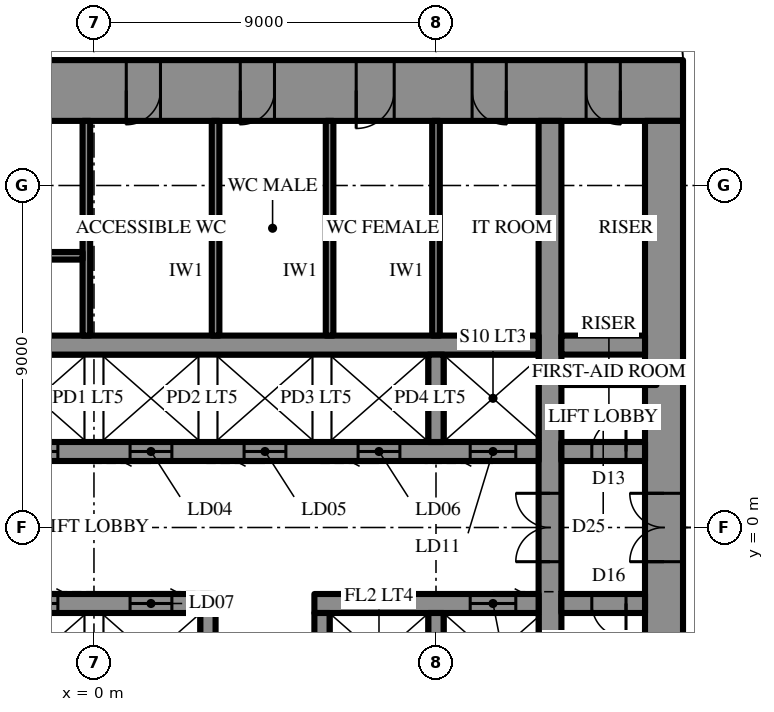
"""IFC4 building model, lengths in metres.
Left out: names, types, materials, properties, quantities, classifications, styles, units other than length and angle.
Written with IfcOpenShell. Run it as: python <this file> out.ifc"""

import sys

from ifc_helpers import new_model, si_unit, direction, frame, frame_2d, origin, place, context, subcontext, project, spatial, rectangle, extrude, element, fill, save


model = new_model("IFC4")
c1 = context("Model", 3, precision=1e-05, world=origin(), true_north=direction((0.0, 1.0)))
c2 = subcontext(c1, "Body", "Model", "MODEL_VIEW")
j1 = project(units=[si_unit("LENGTHUNIT", "METRE"), si_unit("PLANEANGLEUNIT", "RADIAN")], contexts=[c1])
p1 = place(None, origin())
s1 = spatial("IfcSite", under=j1, at=p1, CompositionType="ELEMENT")
p2 = place(p1, origin())
s2 = spatial("IfcBuilding", under=s1, at=p2, CompositionType="ELEMENT")
p3 = place(p2, frame((0.0, 0.0, 306.5)))
s3 = spatial("IfcBuildingStorey", under=s2, at=p3, CompositionType="ELEMENT", Elevation=306.5)
p4 = place(p3, frame((-15.5, 11.5, 0.0), z_axis=(0.0, 0.0, 1.0), x_axis=(1.0, 0.0, 0.0)))
e1 = element("IfcWall", 1, at=p4, inside=s3, PredefinedType="SHEAR", context=c2, shape_type="SweptSolid", body=[
    extrude(rectangle(XDim=31.0, YDim=1.6, at=frame_2d((15.5, 0.0))), origin(), (0.0, 0.0, 1.0), 5.0),
])
p5 = place(p4, frame((16.35, 0.0, 0.0)))
e2 = element("IfcOpeningElement", 2, at=p5, cuts=e1, PredefinedType="OPENING", context=c2, shape_type="SweptSolid", body=[
    extrude(rectangle(XDim=0.9, YDim=2.2, at=frame_2d((0.45, 1.1))), frame((0.0, 0.81, 0.0), z_axis=(0.0, -1.0, 0.0), x_axis=(1.0, 0.0, 0.0)), (0.0, 0.0, 1.0), 1.62),
])
p6 = place(p4, frame((19.35, 0.0, 0.0)))
e3 = element("IfcOpeningElement", 3, at=p6, cuts=e1, PredefinedType="OPENING", context=c2, shape_type="SweptSolid", body=[
    extrude(rectangle(XDim=0.9, YDim=2.2, at=frame_2d((0.45, 1.1))), frame((0.0, 0.81, 0.0), z_axis=(0.0, -1.0, 0.0), x_axis=(1.0, 0.0, 0.0)), (0.0, 0.0, 1.0), 1.62),
])
p7 = place(p4, frame((22.4, 0.0, 0.0)))
e4 = element("IfcOpeningElement", 4, at=p7, cuts=e1, PredefinedType="OPENING", context=c2, shape_type="SweptSolid", body=[
    extrude(rectangle(XDim=1.0, YDim=2.2, at=frame_2d((0.5, 1.1))), frame((0.0, 0.81, 0.0), z_axis=(0.0, -1.0, 0.0), x_axis=(1.0, 0.0, 0.0)), (0.0, 0.0, 1.0), 1.62),
])
p8 = place(p4, frame((1.65, 0.0, 0.0)))
e5 = element("IfcOpeningElement", 5, at=p8, cuts=e1, PredefinedType="OPENING", context=c2, shape_type="SweptSolid", body=[
    extrude(rectangle(XDim=0.9, YDim=2.2, at=frame_2d((0.45, 1.1))), frame((0.0, 0.81, 0.0), z_axis=(0.0, -1.0, 0.0), x_axis=(1.0, 0.0, 0.0)), (0.0, 0.0, 1.0), 1.62),
])
p9 = place(p4, frame((4.65, 0.0, 0.0)))
e6 = element("IfcOpeningElement", 6, at=p9, cuts=e1, PredefinedType="OPENING", context=c2, shape_type="SweptSolid", body=[
    extrude(rectangle(XDim=0.9, YDim=2.2, at=frame_2d((0.45, 1.1))), frame((0.0, 0.81, 0.0), z_axis=(0.0, -1.0, 0.0), x_axis=(1.0, 0.0, 0.0)), (0.0, 0.0, 1.0), 1.62),
])
p10 = place(p4, frame((25.45, 0.0, 0.0)))
e7 = element("IfcOpeningElement", 7, at=p10, cuts=e1, PredefinedType="OPENING", context=c2, shape_type="SweptSolid", body=[
    extrude(rectangle(XDim=0.9, YDim=2.2, at=frame_2d((0.45, 1.1))), frame((0.0, 0.81, 0.0), z_axis=(0.0, -1.0, 0.0), x_axis=(1.0, 0.0, 0.0)), (0.0, 0.0, 1.0), 1.62),
])
p11 = place(p4, frame((28.45, 0.0, 0.0)))
e8 = element("IfcOpeningElement", 8, at=p11, cuts=e1, PredefinedType="OPENING", context=c2, shape_type="SweptSolid", body=[
    extrude(rectangle(XDim=0.9, YDim=2.2, at=frame_2d((0.45, 1.1))), frame((0.0, 0.81, 0.0), z_axis=(0.0, -1.0, 0.0), x_axis=(1.0, 0.0, 0.0)), (0.0, 0.0, 1.0), 1.62),
])
p12 = place(p3, frame((15.0, -10.7, 0.0), z_axis=(0.0, 0.0, 1.0), x_axis=(0.0, 1.0, 0.0)))
e9 = element("IfcWall", 9, at=p12, inside=s3, PredefinedType="SHEAR", context=c2, shape_type="SweptSolid", body=[
    extrude(rectangle(XDim=21.4, YDim=1.0, at=frame_2d((10.7, 0.0))), origin(), (0.0, 0.0, 1.0), 5.0),
])
p13 = place(p12, frame((9.8, 0.0, 0.0)))
e10 = element("IfcOpeningElement", 10, at=p13, cuts=e9, PredefinedType="OPENING", context=c2, shape_type="SweptSolid", body=[
    extrude(rectangle(XDim=1.8, YDim=2.4, at=frame_2d((0.9, 1.2))), frame((0.0, 0.51, 0.0), z_axis=(0.0, -1.0, 0.0), x_axis=(1.0, 0.0, 0.0)), (0.0, 0.0, 1.0), 1.02),
])
p14 = place(p3, frame((12.0, -10.7, 0.0), z_axis=(0.0, 0.0, 1.0), x_axis=(0.0, 1.0, 0.0)))
e11 = element("IfcWall", 11, at=p14, inside=s3, PredefinedType="SHEAR", context=c2, shape_type="SweptSolid", body=[
    extrude(rectangle(XDim=21.4, YDim=0.6, at=frame_2d((10.7, 0.0))), origin(), (0.0, 0.0, 1.0), 5.0),
])
p15 = place(p14, frame((9.8, 0.0, 0.0)))
e12 = element("IfcOpeningElement", 12, at=p15, cuts=e11, PredefinedType="OPENING", context=c2, shape_type="SweptSolid", body=[
    extrude(rectangle(XDim=1.8, YDim=2.4, at=frame_2d((0.9, 1.2))), frame((0.0, 0.31, 0.0), z_axis=(0.0, -1.0, 0.0), x_axis=(1.0, 0.0, 0.0)), (0.0, 0.0, 1.0), 0.62),
])
p16 = place(p3, frame((-3.2, 2.0, 0.0), z_axis=(0.0, 0.0, 1.0), x_axis=(1.0, 0.0, 0.0)))
e13 = element("IfcWall", 13, at=p16, inside=s3, PredefinedType="SHEAR", context=c2, shape_type="SweptSolid", body=[
    extrude(rectangle(XDim=14.9, YDim=0.5, at=frame_2d((7.45, 0.0))), origin(), (0.0, 0.0, 1.0), 5.0),
])
p17 = place(p16, frame((1.15, 0.0, 0.0)))
e14 = element("IfcOpeningElement", 14, at=p17, cuts=e13, PredefinedType="OPENING", context=c2, shape_type="SweptSolid", body=[
    extrude(rectangle(XDim=1.1, YDim=2.2, at=frame_2d((0.55, 1.1))), frame((0.0, 0.26, 0.0), z_axis=(0.0, -1.0, 0.0), x_axis=(1.0, 0.0, 0.0)), (0.0, 0.0, 1.0), 0.52),
])
p18 = place(p16, frame((4.15, 0.0, 0.0)))
e15 = element("IfcOpeningElement", 15, at=p18, cuts=e13, PredefinedType="OPENING", context=c2, shape_type="SweptSolid", body=[
    extrude(rectangle(XDim=1.1, YDim=2.2, at=frame_2d((0.55, 1.1))), frame((0.0, 0.26, 0.0), z_axis=(0.0, -1.0, 0.0), x_axis=(1.0, 0.0, 0.0)), (0.0, 0.0, 1.0), 0.52),
])
p19 = place(p16, frame((7.15, 0.0, 0.0)))
e16 = element("IfcOpeningElement", 16, at=p19, cuts=e13, PredefinedType="OPENING", context=c2, shape_type="SweptSolid", body=[
    extrude(rectangle(XDim=1.1, YDim=2.2, at=frame_2d((0.55, 1.1))), frame((0.0, 0.26, 0.0), z_axis=(0.0, -1.0, 0.0), x_axis=(1.0, 0.0, 0.0)), (0.0, 0.0, 1.0), 0.52),
])
p20 = place(p16, frame((10.15, 0.0, 0.0)))
e17 = element("IfcOpeningElement", 17, at=p20, cuts=e13, PredefinedType="OPENING", context=c2, shape_type="SweptSolid", body=[
    extrude(rectangle(XDim=1.1, YDim=2.2, at=frame_2d((0.55, 1.1))), frame((0.0, 0.26, 0.0), z_axis=(0.0, -1.0, 0.0), x_axis=(1.0, 0.0, 0.0)), (0.0, 0.0, 1.0), 0.52),
])
p21 = place(p16, frame((13.1, 0.0, 0.0)))
e18 = element("IfcOpeningElement", 18, at=p21, cuts=e13, PredefinedType="OPENING", context=c2, shape_type="SweptSolid", body=[
    extrude(rectangle(XDim=1.2, YDim=2.2, at=frame_2d((0.6, 1.1))), frame((0.0, 0.26, 0.0), z_axis=(0.0, -1.0, 0.0), x_axis=(1.0, 0.0, 0.0)), (0.0, 0.0, 1.0), 0.52),
])
p22 = place(p3, frame((12.3, 2.0, 0.0), z_axis=(0.0, 0.0, 1.0), x_axis=(1.0, 0.0, 0.0)))
e19 = element("IfcWall", 19, at=p22, inside=s3, PredefinedType="SHEAR", context=c2, shape_type="SweptSolid", body=[
    extrude(rectangle(XDim=2.2, YDim=0.5, at=frame_2d((1.1, 0.0))), origin(), (0.0, 0.0, 1.0), 5.0),
])
p23 = place(p22, frame((0.8, 0.0, 0.0)))
e20 = element("IfcOpeningElement", 20, at=p23, cuts=e19, PredefinedType="OPENING", context=c2, shape_type="SweptSolid", body=[
    extrude(rectangle(XDim=0.9, YDim=2.2, at=frame_2d((0.45, 1.1))), frame((0.0, 0.26, 0.0), z_axis=(0.0, -1.0, 0.0), x_axis=(1.0, 0.0, 0.0)), (0.0, 0.0, 1.0), 0.52),
])
p24 = place(p3, frame((-11.7, 4.8, 0.0), z_axis=(0.0, 0.0, 1.0), x_axis=(1.0, 0.0, 0.0)))
e21 = element("IfcWall", 21, at=p24, inside=s3, PredefinedType="SHEAR", context=c2, shape_type="SweptSolid", body=[
    extrude(rectangle(XDim=23.4, YDim=0.5, at=frame_2d((11.7, 0.0))), origin(), (0.0, 0.0, 1.0), 5.0),
])
p25 = place(p24, frame((6.6, 0.0, 0.0)))
e22 = element("IfcOpeningElement", 22, at=p25, cuts=e21, PredefinedType="OPENING", context=c2, shape_type="SweptSolid", body=[
    extrude(rectangle(XDim=1.2, YDim=2.2, at=frame_2d((0.6, 1.1))), frame((0.0, 0.26, 0.0), z_axis=(0.0, -1.0, 0.0), x_axis=(1.0, 0.0, 0.0)), (0.0, 0.0, 1.0), 0.52),
])
p26 = place(p24, frame((3.6, 0.0, 0.0)))
e23 = element("IfcOpeningElement", 23, at=p26, cuts=e21, PredefinedType="OPENING", context=c2, shape_type="SweptSolid", body=[
    extrude(rectangle(XDim=1.2, YDim=2.2, at=frame_2d((0.6, 1.1))), frame((0.0, 0.26, 0.0), z_axis=(0.0, -1.0, 0.0), x_axis=(1.0, 0.0, 0.0)), (0.0, 0.0, 1.0), 0.52),
])
p27 = place(p3, frame((12.3, 4.8, 0.0), z_axis=(0.0, 0.0, 1.0), x_axis=(1.0, 0.0, 0.0)))
e24 = element("IfcWall", 24, at=p27, inside=s3, PredefinedType="SHEAR", context=c2, shape_type="SweptSolid", body=[
    extrude(rectangle(XDim=2.2, YDim=0.5, at=frame_2d((1.1, 0.0))), origin(), (0.0, 0.0, 1.0), 5.0),
])
p28 = place(p3, frame((9.0, 2.25, 0.0), z_axis=(0.0, 0.0, 1.0), x_axis=(0.0, 1.0, 0.0)))
e25 = element("IfcWall", 25, at=p28, inside=s3, PredefinedType="SHEAR", context=c2, shape_type="SweptSolid", body=[
    extrude(rectangle(XDim=2.3, YDim=0.4, at=frame_2d((1.15, 0.0))), origin(), (0.0, 0.0, 1.0), 5.0),
])
p29 = place(p3, frame((-0.2, 5.05, 0.0), z_axis=(0.0, 0.0, 1.0), x_axis=(0.0, 1.0, 0.0)))
e26 = element("IfcWall", 26, at=p29, inside=s3, PredefinedType="SHEAR", context=c2, shape_type="SweptSolid", body=[
    extrude(rectangle(XDim=5.65, YDim=0.2, at=frame_2d((2.825, 0.0))), origin(), (0.0, 0.0, 1.0), 5.0),
])
p30 = place(p3, frame((-8.9, 7.15, 0.0), z_axis=(0.0, 0.0, 1.0), x_axis=(1.0, 0.0, 0.0)))
e27 = element("IfcWall", 27, at=p30, inside=s3, PredefinedType="SHEAR", context=c2, shape_type="SweptSolid", body=[
    extrude(rectangle(XDim=8.6, YDim=0.2, at=frame_2d((4.3, 0.0))), origin(), (0.0, 0.0, 1.0), 5.0),
])
p31 = place(p30, frame((0.3, 0.0, 0.0)))
e28 = element("IfcOpeningElement", 28, at=p31, cuts=e27, PredefinedType="OPENING", context=c2, shape_type="SweptSolid", body=[
    extrude(rectangle(XDim=1.0, YDim=2.2, at=frame_2d((0.5, 1.1))), frame((0.0, 0.11, 0.0), z_axis=(0.0, -1.0, 0.0), x_axis=(1.0, 0.0, 0.0)), (0.0, 0.0, 1.0), 0.22),
])
p32 = place(p3, frame((14.5, -2.0, 0.0), z_axis=(0.0, 0.0, 1.0), x_axis=(-1.0, 0.0, 0.0)))
e29 = element("IfcWall", 29, at=p32, inside=s3, PredefinedType="SHEAR", context=c2, shape_type="SweptSolid", body=[
    extrude(rectangle(XDim=2.2, YDim=0.5, at=frame_2d((1.1, 0.0))), origin(), (0.0, 0.0, 1.0), 5.0),
])
p33 = place(p32, frame((0.5, 0.0, 0.0)))
e30 = element("IfcOpeningElement", 30, at=p33, cuts=e29, PredefinedType="OPENING", context=c2, shape_type="SweptSolid", body=[
    extrude(rectangle(XDim=0.9, YDim=2.2, at=frame_2d((0.45, 1.1))), frame((0.0, 0.26, 0.0), z_axis=(0.0, -1.0, 0.0), x_axis=(1.0, 0.0, 0.0)), (0.0, 0.0, 1.0), 0.52),
])
p34 = place(p3, frame((11.7, -2.0, 0.0), z_axis=(0.0, 0.0, 1.0), x_axis=(-1.0, 0.0, 0.0)))
e31 = element("IfcWall", 31, at=p34, inside=s3, PredefinedType="SHEAR", context=c2, shape_type="SweptSolid", body=[
    extrude(rectangle(XDim=5.9, YDim=0.5, at=frame_2d((2.95, 0.0))), origin(), (0.0, 0.0, 1.0), 5.0),
])
p35 = place(p34, frame((0.6, 0.0, 0.0)))
e32 = element("IfcOpeningElement", 32, at=p35, cuts=e31, PredefinedType="OPENING", context=c2, shape_type="SweptSolid", body=[
    extrude(rectangle(XDim=1.2, YDim=2.2, at=frame_2d((0.6, 1.1))), frame((0.0, 0.26, 0.0), z_axis=(0.0, -1.0, 0.0), x_axis=(1.0, 0.0, 0.0)), (0.0, 0.0, 1.0), 0.52),
])
p36 = place(p3, frame((3.2, -2.0, 0.0), z_axis=(0.0, 0.0, 1.0), x_axis=(-1.0, 0.0, 0.0)))
e33 = element("IfcWall", 33, at=p36, inside=s3, PredefinedType="SHEAR", context=c2, shape_type="SweptSolid", body=[
    extrude(rectangle(XDim=14.9, YDim=0.5, at=frame_2d((7.45, 0.0))), origin(), (0.0, 0.0, 1.0), 5.0),
])
p37 = place(p36, frame((1.15, 0.0, 0.0)))
e34 = element("IfcOpeningElement", 34, at=p37, cuts=e33, PredefinedType="OPENING", context=c2, shape_type="SweptSolid", body=[
    extrude(rectangle(XDim=1.1, YDim=2.2, at=frame_2d((0.55, 1.1))), frame((0.0, 0.26, 0.0), z_axis=(0.0, -1.0, 0.0), x_axis=(1.0, 0.0, 0.0)), (0.0, 0.0, 1.0), 0.52),
])
p38 = place(p36, frame((4.15, 0.0, 0.0)))
e35 = element("IfcOpeningElement", 35, at=p38, cuts=e33, PredefinedType="OPENING", context=c2, shape_type="SweptSolid", body=[
    extrude(rectangle(XDim=1.1, YDim=2.2, at=frame_2d((0.55, 1.1))), frame((0.0, 0.26, 0.0), z_axis=(0.0, -1.0, 0.0), x_axis=(1.0, 0.0, 0.0)), (0.0, 0.0, 1.0), 0.52),
])
p39 = place(p36, frame((7.15, 0.0, 0.0)))
e36 = element("IfcOpeningElement", 36, at=p39, cuts=e33, PredefinedType="OPENING", context=c2, shape_type="SweptSolid", body=[
    extrude(rectangle(XDim=1.1, YDim=2.2, at=frame_2d((0.55, 1.1))), frame((0.0, 0.26, 0.0), z_axis=(0.0, -1.0, 0.0), x_axis=(1.0, 0.0, 0.0)), (0.0, 0.0, 1.0), 0.52),
])
p40 = place(p36, frame((10.15, 0.0, 0.0)))
e37 = element("IfcOpeningElement", 37, at=p40, cuts=e33, PredefinedType="OPENING", context=c2, shape_type="SweptSolid", body=[
    extrude(rectangle(XDim=1.1, YDim=2.2, at=frame_2d((0.55, 1.1))), frame((0.0, 0.26, 0.0), z_axis=(0.0, -1.0, 0.0), x_axis=(1.0, 0.0, 0.0)), (0.0, 0.0, 1.0), 0.52),
])
p41 = place(p36, frame((13.1, 0.0, 0.0)))
e38 = element("IfcOpeningElement", 38, at=p41, cuts=e33, PredefinedType="OPENING", context=c2, shape_type="SweptSolid", body=[
    extrude(rectangle(XDim=1.2, YDim=2.2, at=frame_2d((0.6, 1.1))), frame((0.0, 0.26, 0.0), z_axis=(0.0, -1.0, 0.0), x_axis=(1.0, 0.0, 0.0)), (0.0, 0.0, 1.0), 0.52),
])
for number, where, z_axis, x_axis in (
    (39, (9.0, -2.25, 0.0), (0.0, 0.0, 1.0), (0.0, -1.0, 0.0)),
    (40, (6.0, -2.25, 0.0), (0.0, 0.0, 1.0), (0.0, -1.0, 0.0)),
    (41, (3.0, -2.25, 0.0), (0.0, 0.0, 1.0), (0.0, -1.0, 0.0)),
):
    element("IfcWall", number, at=place(p3, frame(where, z_axis=z_axis, x_axis=x_axis)), inside=s3, PredefinedType="SHEAR", context=c2, shape_type="SweptSolid", body=[
        extrude(rectangle(XDim=2.3, YDim=0.4, at=frame_2d((1.15, 0.0))), origin(), (0.0, 0.0, 1.0), 5.0),
    ])
for number, where, z_axis, x_axis in (
    (42, (9.0, 5.05, 0.0), (0.0, 0.0, 1.0), (0.0, 1.0, 0.0)),
    (43, (3.2, 5.05, 0.0), (0.0, 0.0, 1.0), (0.0, 1.0, 0.0)),
    (44, (6.2, 5.05, 0.0), (0.0, 0.0, 1.0), (0.0, 1.0, 0.0)),
):
    element("IfcWall", number, at=place(p3, frame(where, z_axis=z_axis, x_axis=x_axis)), inside=s3, PredefinedType="PARTITIONING", context=c2, shape_type="SweptSolid", body=[
        extrude(rectangle(XDim=5.65, YDim=0.2, at=frame_2d((2.825, 0.0))), origin(), (0.0, 0.0, 1.0), 4.8),
    ])
p42 = place(p3, frame((12.3, 3.85, 0.0), z_axis=(0.0, 0.0, 1.0), x_axis=(1.0, 0.0, 0.0)))
e45 = element("IfcWall", 45, at=p42, inside=s3, PredefinedType="PARTITIONING", context=c2, shape_type="SweptSolid", body=[
    extrude(rectangle(XDim=2.5, YDim=0.2, at=frame_2d((1.25, 0.0))), origin(), (0.0, 0.0, 1.0), 4.8),
])
p43 = place(p13, origin())
e46 = element("IfcDoor", 46, at=p43, inside=s3, OperationType="DOUBLE_DOOR_SINGLE_SWING", PredefinedType="DOOR", context=c2, shape_type="SweptSolid", body=[
    extrude(rectangle(XDim=1.8, YDim=2.4, at=frame_2d((0.9, 1.2))), frame((0.0, 0.025, 0.0), z_axis=(0.0, -1.0, 0.0), x_axis=(1.0, 0.0, 0.0)), (0.0, 0.0, 1.0), 0.05),
])
fill(e10, e46)
p44 = place(p5, frame((0.9, 0.0, 0.0), z_axis=(0.0, 0.0, 1.0), x_axis=(-1.0, 0.0, 0.0)))
e47 = element("IfcDoor", 47, at=p44, inside=s3, OperationType="SINGLE_SWING_LEFT", PredefinedType="DOOR", context=c2, shape_type="SweptSolid", body=[
    extrude(rectangle(XDim=0.9, YDim=2.2, at=frame_2d((0.45, 1.1))), frame((0.0, 0.025, 0.0), z_axis=(0.0, -1.0, 0.0), x_axis=(1.0, 0.0, 0.0)), (0.0, 0.0, 1.0), 0.05),
])
fill(e2, e47)
p45 = place(p6, frame((0.9, 0.0, 0.0), z_axis=(0.0, 0.0, 1.0), x_axis=(-1.0, 0.0, 0.0)))
e48 = element("IfcDoor", 48, at=p45, inside=s3, OperationType="SINGLE_SWING_LEFT", PredefinedType="DOOR", context=c2, shape_type="SweptSolid", body=[
    extrude(rectangle(XDim=0.9, YDim=2.2, at=frame_2d((0.45, 1.1))), frame((0.0, 0.025, 0.0), z_axis=(0.0, -1.0, 0.0), x_axis=(1.0, 0.0, 0.0)), (0.0, 0.0, 1.0), 0.05),
])
fill(e3, e48)
p46 = place(p7, frame((1.0, 0.0, 0.0), z_axis=(0.0, 0.0, 1.0), x_axis=(-1.0, 0.0, 0.0)))
e49 = element("IfcDoor", 49, at=p46, inside=s3, OperationType="SINGLE_SWING_LEFT", PredefinedType="DOOR", context=c2, shape_type="SweptSolid", body=[
    extrude(rectangle(XDim=1.0, YDim=2.2, at=frame_2d((0.5, 1.1))), frame((0.0, 0.025, 0.0), z_axis=(0.0, -1.0, 0.0), x_axis=(1.0, 0.0, 0.0)), (0.0, 0.0, 1.0), 0.05),
])
fill(e4, e49)
p47 = place(p10, frame((0.9, 0.0, 0.0), z_axis=(0.0, 0.0, 1.0), x_axis=(-1.0, 0.0, 0.0)))
e50 = element("IfcDoor", 50, at=p47, inside=s3, OperationType="SINGLE_SWING_RIGHT", PredefinedType="DOOR", context=c2, shape_type="SweptSolid", body=[
    extrude(rectangle(XDim=0.9, YDim=2.2, at=frame_2d((0.45, 1.1))), frame((0.0, 0.025, 0.0), z_axis=(0.0, -1.0, 0.0), x_axis=(1.0, 0.0, 0.0)), (0.0, 0.0, 1.0), 0.05),
])
fill(e7, e50)
p48 = place(p11, frame((0.9, 0.0, 0.0), z_axis=(0.0, 0.0, 1.0), x_axis=(-1.0, 0.0, 0.0)))
e51 = element("IfcDoor", 51, at=p48, inside=s3, OperationType="SINGLE_SWING_RIGHT", PredefinedType="DOOR", context=c2, shape_type="SweptSolid", body=[
    extrude(rectangle(XDim=0.9, YDim=2.2, at=frame_2d((0.45, 1.1))), frame((0.0, 0.025, 0.0), z_axis=(0.0, -1.0, 0.0), x_axis=(1.0, 0.0, 0.0)), (0.0, 0.0, 1.0), 0.05),
])
fill(e8, e51)
p49 = place(p23, origin())
e52 = element("IfcDoor", 52, at=p49, inside=s3, OperationType="SINGLE_SWING_LEFT", PredefinedType="DOOR", context=c2, shape_type="SweptSolid", body=[
    extrude(rectangle(XDim=0.9, YDim=2.2, at=frame_2d((0.45, 1.1))), frame((0.0, 0.025, 0.0), z_axis=(0.0, -1.0, 0.0), x_axis=(1.0, 0.0, 0.0)), (0.0, 0.0, 1.0), 0.05),
])
fill(e20, e52)
p50 = place(p33, origin())
e53 = element("IfcDoor", 53, at=p50, inside=s3, OperationType="SINGLE_SWING_RIGHT", PredefinedType="DOOR", context=c2, shape_type="SweptSolid", body=[
    extrude(rectangle(XDim=0.9, YDim=2.2, at=frame_2d((0.45, 1.1))), frame((0.0, 0.025, 0.0), z_axis=(0.0, -1.0, 0.0), x_axis=(1.0, 0.0, 0.0)), (0.0, 0.0, 1.0), 0.05),
])
fill(e30, e53)
p51 = place(p15, origin())
e54 = element("IfcDoor", 54, at=p51, inside=s3, OperationType="DOUBLE_DOOR_SINGLE_SWING", PredefinedType="DOOR", context=c2, shape_type="SweptSolid", body=[
    extrude(rectangle(XDim=1.8, YDim=2.4, at=frame_2d((0.9, 1.2))), frame((0.0, 0.025, 0.0), z_axis=(0.0, -1.0, 0.0), x_axis=(1.0, 0.0, 0.0)), (0.0, 0.0, 1.0), 0.05),
])
fill(e12, e54)
p52 = place(p17, frame((1.1, 0.0, 0.0), z_axis=(0.0, 0.0, 1.0), x_axis=(-1.0, 0.0, 0.0)))
e55 = element("IfcDoor", 55, at=p52, inside=s3, OperationType="SLIDING_TO_LEFT", PredefinedType="DOOR", context=c2, shape_type="SweptSolid", body=[
    extrude(rectangle(XDim=1.1, YDim=2.2, at=frame_2d((0.55, 1.1))), frame((0.0, 0.025, 0.0), z_axis=(0.0, -1.0, 0.0), x_axis=(1.0, 0.0, 0.0)), (0.0, 0.0, 1.0), 0.05),
])
fill(e14, e55)
p53 = place(p18, frame((1.1, 0.0, 0.0), z_axis=(0.0, 0.0, 1.0), x_axis=(-1.0, 0.0, 0.0)))
e56 = element("IfcDoor", 56, at=p53, inside=s3, OperationType="SLIDING_TO_LEFT", PredefinedType="DOOR", context=c2, shape_type="SweptSolid", body=[
    extrude(rectangle(XDim=1.1, YDim=2.2, at=frame_2d((0.55, 1.1))), frame((0.0, 0.025, 0.0), z_axis=(0.0, -1.0, 0.0), x_axis=(1.0, 0.0, 0.0)), (0.0, 0.0, 1.0), 0.05),
])
fill(e15, e56)
p54 = place(p19, frame((1.1, 0.0, 0.0), z_axis=(0.0, 0.0, 1.0), x_axis=(-1.0, 0.0, 0.0)))
e57 = element("IfcDoor", 57, at=p54, inside=s3, OperationType="SLIDING_TO_LEFT", PredefinedType="DOOR", context=c2, shape_type="SweptSolid", body=[
    extrude(rectangle(XDim=1.1, YDim=2.2, at=frame_2d((0.55, 1.1))), frame((0.0, 0.025, 0.0), z_axis=(0.0, -1.0, 0.0), x_axis=(1.0, 0.0, 0.0)), (0.0, 0.0, 1.0), 0.05),
])
fill(e16, e57)
p55 = place(p20, frame((1.1, 0.0, 0.0), z_axis=(0.0, 0.0, 1.0), x_axis=(-1.0, 0.0, 0.0)))
e58 = element("IfcDoor", 58, at=p55, inside=s3, OperationType="SLIDING_TO_LEFT", PredefinedType="DOOR", context=c2, shape_type="SweptSolid", body=[
    extrude(rectangle(XDim=1.1, YDim=2.2, at=frame_2d((0.55, 1.1))), frame((0.0, 0.025, 0.0), z_axis=(0.0, -1.0, 0.0), x_axis=(1.0, 0.0, 0.0)), (0.0, 0.0, 1.0), 0.05),
])
fill(e17, e58)
p56 = place(p21, frame((1.2, 0.0, 0.0), z_axis=(0.0, 0.0, 1.0), x_axis=(-1.0, 0.0, 0.0)))
e59 = element("IfcDoor", 59, at=p56, inside=s3, OperationType="SLIDING_TO_LEFT", PredefinedType="DOOR", context=c2, shape_type="SweptSolid", body=[
    extrude(rectangle(XDim=1.2, YDim=2.2, at=frame_2d((0.6, 1.1))), frame((0.0, 0.025, 0.0), z_axis=(0.0, -1.0, 0.0), x_axis=(1.0, 0.0, 0.0)), (0.0, 0.0, 1.0), 0.05),
])
fill(e18, e59)
p57 = place(p35, frame((1.2, 0.0, 0.0), z_axis=(0.0, 0.0, 1.0), x_axis=(-1.0, 0.0, 0.0)))
e60 = element("IfcDoor", 60, at=p57, inside=s3, OperationType="SLIDING_TO_LEFT", PredefinedType="DOOR", context=c2, shape_type="SweptSolid", body=[
    extrude(rectangle(XDim=1.2, YDim=2.2, at=frame_2d((0.6, 1.1))), frame((0.0, 0.025, 0.0), z_axis=(0.0, -1.0, 0.0), x_axis=(1.0, 0.0, 0.0)), (0.0, 0.0, 1.0), 0.05),
])
fill(e32, e60)
p58 = place(p37, frame((1.1, 0.0, 0.0), z_axis=(0.0, 0.0, 1.0), x_axis=(-1.0, 0.0, 0.0)))
e61 = element("IfcDoor", 61, at=p58, inside=s3, OperationType="SLIDING_TO_LEFT", PredefinedType="DOOR", context=c2, shape_type="SweptSolid", body=[
    extrude(rectangle(XDim=1.1, YDim=2.2, at=frame_2d((0.55, 1.1))), frame((0.0, 0.025, 0.0), z_axis=(0.0, -1.0, 0.0), x_axis=(1.0, 0.0, 0.0)), (0.0, 0.0, 1.0), 0.05),
])
fill(e34, e61)
p59 = place(p38, frame((1.1, 0.0, 0.0), z_axis=(0.0, 0.0, 1.0), x_axis=(-1.0, 0.0, 0.0)))
e62 = element("IfcDoor", 62, at=p59, inside=s3, OperationType="SLIDING_TO_LEFT", PredefinedType="DOOR", context=c2, shape_type="SweptSolid", body=[
    extrude(rectangle(XDim=1.1, YDim=2.2, at=frame_2d((0.55, 1.1))), frame((0.0, 0.025, 0.0), z_axis=(0.0, -1.0, 0.0), x_axis=(1.0, 0.0, 0.0)), (0.0, 0.0, 1.0), 0.05),
])
fill(e35, e62)
save(model, sys.argv[1])
